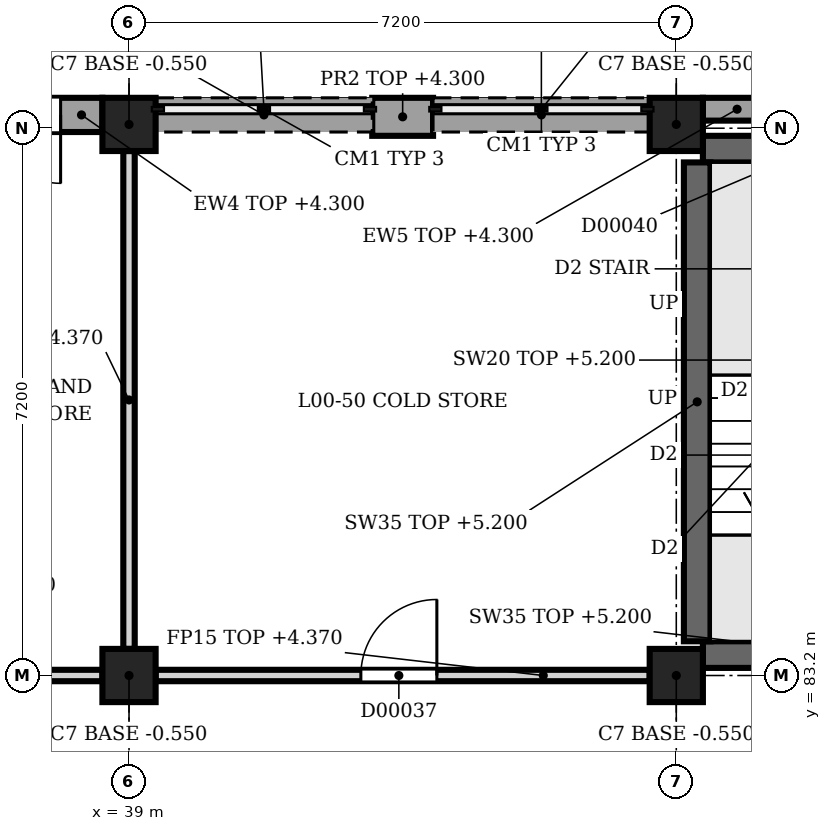
"""IFC4 building model, lengths in metres.
Left out: names, types, materials, properties, quantities, classifications, styles, units other than length and angle.
Written with IfcOpenShell. Run it as: python <this file> out.ifc"""

import sys

from ifc_helpers import new_model, si_unit, direction, frame, frame_2d, origin, origin_2d, place, context, subcontext, project, spatial, rectangle, extrude, element, fill, save


model = new_model("IFC4")
c1 = context("Model", 3, precision=1e-05, world=origin(), true_north=direction((0.0, 1.0)))
c2 = subcontext(c1, "Body", "Model", "MODEL_VIEW")
j1 = project(units=[si_unit("LENGTHUNIT", "METRE"), si_unit("PLANEANGLEUNIT", "RADIAN")], contexts=[c1])
p1 = place(None, origin())
s1 = spatial("IfcSite", under=j1, at=p1, CompositionType="ELEMENT")
p2 = place(p1, origin())
s2 = spatial("IfcBuilding", under=s1, at=p2, CompositionType="ELEMENT")
p3 = place(p2, origin())
s3 = spatial("IfcBuildingStorey", under=s2, at=p3, CompositionType="ELEMENT", Elevation=0.0)
for number, where, z_axis, x_axis in (
    (1, (39.0, 83.2, -0.55), (0.0, 0.0, 1.0), (1.0, 0.0, 0.0)),
    (2, (39.0, 90.45, -0.55), (0.0, 0.0, 1.0), (1.0, 0.0, 0.0)),
    (3, (46.2, 83.2, -0.55), (0.0, 0.0, 1.0), (1.0, 0.0, 0.0)),
    (4, (46.2, 90.45, -0.55), (0.0, 0.0, 1.0), (1.0, 0.0, 0.0)),
):
    element("IfcColumn", number, at=place(p3, frame(where, z_axis=z_axis, x_axis=x_axis)), inside=s3, PredefinedType="COLUMN", context=c2, shape_type="SweptSolid", body=[
        extrude(rectangle(XDim=0.7, YDim=0.7, at=origin_2d()), origin(), (0.0, 0.0, 1.0), 5.95),
    ])
p4 = place(p3, frame((42.2, 90.55, 0.0), z_axis=(0.0, 0.0, 1.0), x_axis=(1.0, 0.0, 0.0)))
e5 = element("IfcWall", 5, at=p4, inside=s3, PredefinedType="SOLIDWALL", context=c2, shape_type="SweptSolid", body=[
    extrude(rectangle(XDim=0.8, YDim=0.5, at=frame_2d((0.4, 0.0))), origin(), (0.0, 0.0, 1.0), 4.3),
])
p5 = place(p3, frame((35.8, 90.575, 0.0), z_axis=(0.0, 0.0, 1.0), x_axis=(1.0, 0.0, 0.0)))
e6 = element("IfcWall", 6, at=p5, inside=s3, PredefinedType="SOLIDWALL", context=c2, shape_type="SweptSolid", body=[
    extrude(rectangle(XDim=2.85, YDim=0.45, at=frame_2d((1.425, 0.0))), origin(), (0.0, 0.0, 1.0), 4.3),
])
p6 = place(p5, frame((0.5, 0.0, 0.0)))
e7 = element("IfcOpeningElement", 7, at=p6, cuts=e6, PredefinedType="OPENING", context=c2, shape_type="SweptSolid", body=[
    extrude(rectangle(XDim=1.8, YDim=2.2, at=frame_2d((0.9, 1.1))), frame((0.0, 0.235, 0.0), z_axis=(0.0, -1.0, 0.0), x_axis=(1.0, 0.0, 0.0)), (0.0, 0.0, 1.0), 0.47),
])
p7 = place(p3, frame((39.35, 90.575, 0.0), z_axis=(0.0, 0.0, 1.0), x_axis=(1.0, 0.0, 0.0)))
e8 = element("IfcWall", 8, at=p7, inside=s3, PredefinedType="SOLIDWALL", context=c2, shape_type="SweptSolid", body=[
    extrude(rectangle(XDim=2.85, YDim=0.45, at=frame_2d((1.425, 0.0))), origin(), (0.0, 0.0, 1.0), 0.6),
])
p8 = place(p3, frame((43.0, 90.575, 0.0), z_axis=(0.0, 0.0, 1.0), x_axis=(1.0, 0.0, 0.0)))
e9 = element("IfcWall", 9, at=p8, inside=s3, PredefinedType="SOLIDWALL", context=c2, shape_type="SweptSolid", body=[
    extrude(rectangle(XDim=2.85, YDim=0.45, at=frame_2d((1.425, 0.0))), origin(), (0.0, 0.0, 1.0), 0.6),
])
p9 = place(p3, frame((46.55, 90.65, 0.0), z_axis=(0.0, 0.0, 1.0), x_axis=(1.0, 0.0, 0.0)))
e10 = element("IfcWall", 10, at=p9, inside=s3, PredefinedType="SOLIDWALL", context=c2, shape_type="SweptSolid", body=[
    extrude(rectangle(XDim=2.85, YDim=0.3, at=frame_2d((1.425, 0.0))), origin(), (0.0, 0.0, 1.0), 4.3),
])
p10 = place(p9, frame((0.9, 0.0, 0.0)))
e11 = element("IfcOpeningElement", 11, at=p10, cuts=e10, PredefinedType="OPENING", context=c2, shape_type="SweptSolid", body=[
    extrude(rectangle(XDim=1.1, YDim=2.2, at=frame_2d((0.55, 1.1))), frame((0.0, 0.16, 0.0), z_axis=(0.0, -1.0, 0.0), x_axis=(1.0, 0.0, 0.0)), (0.0, 0.0, 1.0), 0.32),
])
p11 = place(p9, frame((0.9, 0.0, 2.3)))
e12 = element("IfcOpeningElement", 12, at=p11, cuts=e10, PredefinedType="OPENING", context=c2, shape_type="SweptSolid", body=[
    extrude(rectangle(XDim=1.1, YDim=0.45, at=frame_2d((0.55, 0.225))), frame((0.0, 0.16, 0.0), z_axis=(0.0, -1.0, 0.0), x_axis=(1.0, 0.0, 0.0)), (0.0, 0.0, 1.0), 0.32),
])
p12 = place(p3, frame((46.55, 83.475, 0.0), z_axis=(0.0, 0.0, 1.0), x_axis=(1.0, 0.0, 0.0)))
e13 = element("IfcWall", 13, at=p12, inside=s3, PredefinedType="SHEAR", context=c2, shape_type="SweptSolid", body=[
    extrude(rectangle(XDim=6.5, YDim=0.35, at=frame_2d((3.25, 0.0))), origin(), (0.0, 0.0, 1.0), 5.2),
])
p13 = place(p12, frame((3.85, 0.0, 0.0)))
e14 = element("IfcOpeningElement", 14, at=p13, cuts=e13, PredefinedType="OPENING", context=c2, shape_type="SweptSolid", body=[
    extrude(rectangle(XDim=1.2, YDim=2.1, at=frame_2d((0.6, 1.05))), frame((0.0, 0.185, 0.0), z_axis=(0.0, -1.0, 0.0), x_axis=(1.0, 0.0, 0.0)), (0.0, 0.0, 1.0), 0.37),
])
p14 = place(p3, frame((46.55, 90.125, 0.0), z_axis=(0.0, 0.0, 1.0), x_axis=(1.0, 0.0, 0.0)))
e15 = element("IfcWall", 15, at=p14, inside=s3, PredefinedType="SHEAR", context=c2, shape_type="SweptSolid", body=[
    extrude(rectangle(XDim=6.5, YDim=0.35, at=frame_2d((3.25, 0.0))), origin(), (0.0, 0.0, 1.0), 5.2),
])
p15 = place(p14, frame((0.9, 0.0, 0.0)))
e16 = element("IfcOpeningElement", 16, at=p15, cuts=e15, PredefinedType="OPENING", context=c2, shape_type="SweptSolid", body=[
    extrude(rectangle(XDim=1.1, YDim=2.1, at=frame_2d((0.55, 1.05))), frame((0.0, 0.185, 0.0), z_axis=(0.0, -1.0, 0.0), x_axis=(1.0, 0.0, 0.0)), (0.0, 0.0, 1.0), 0.37),
])
p16 = place(p3, frame((46.475, 83.65, 0.0), z_axis=(0.0, 0.0, 1.0), x_axis=(0.0, 1.0, 0.0)))
e17 = element("IfcWall", 17, at=p16, inside=s3, PredefinedType="SHEAR", context=c2, shape_type="SweptSolid", body=[
    extrude(rectangle(XDim=6.3, YDim=0.35, at=frame_2d((3.15, 0.0))), origin(), (0.0, 0.0, 1.0), 5.2),
])
p17 = place(p3, frame((35.4, 83.2, 0.0), z_axis=(0.0, 0.0, 1.0), x_axis=(1.0, 0.0, 0.0)))
e18 = element("IfcWall", 18, at=p17, inside=s3, PredefinedType="PARTITIONING", context=c2, shape_type="SweptSolid", body=[
    extrude(rectangle(XDim=3.25, YDim=0.15, at=frame_2d((1.625, 0.0))), origin(), (0.0, 0.0, 1.0), 4.37),
])
p18 = place(p17, frame((1.35, 0.0, 0.0)))
e19 = element("IfcOpeningElement", 19, at=p18, cuts=e18, PredefinedType="OPENING", context=c2, shape_type="SweptSolid", body=[
    extrude(rectangle(XDim=0.85, YDim=2.1, at=frame_2d((0.425, 1.05))), frame((0.0, 0.085, 0.0), z_axis=(0.0, -1.0, 0.0), x_axis=(1.0, 0.0, 0.0)), (0.0, 0.0, 1.0), 0.17),
])
p19 = place(p3, frame((39.35, 83.2, 0.0), z_axis=(0.0, 0.0, 1.0), x_axis=(1.0, 0.0, 0.0)))
e20 = element("IfcWall", 20, at=p19, inside=s3, PredefinedType="PARTITIONING", context=c2, shape_type="SweptSolid", body=[
    extrude(rectangle(XDim=6.5, YDim=0.15, at=frame_2d((3.25, 0.0))), origin(), (0.0, 0.0, 1.0), 4.37),
])
p20 = place(p19, frame((2.7, 0.0, 0.0)))
e21 = element("IfcOpeningElement", 21, at=p20, cuts=e20, PredefinedType="OPENING", context=c2, shape_type="SweptSolid", body=[
    extrude(rectangle(XDim=1.0, YDim=2.3, at=frame_2d((0.5, 1.15))), frame((0.0, 0.085, 0.0), z_axis=(0.0, -1.0, 0.0), x_axis=(1.0, 0.0, 0.0)), (0.0, 0.0, 1.0), 0.17),
])
p21 = place(p3, frame((39.0, 83.55, 0.0), z_axis=(0.0, 0.0, 1.0), x_axis=(0.0, 1.0, 0.0)))
e22 = element("IfcWall", 22, at=p21, inside=s3, PredefinedType="PARTITIONING", context=c2, shape_type="SweptSolid", body=[
    extrude(rectangle(XDim=6.55, YDim=0.15, at=frame_2d((3.275, 0.0))), origin(), (0.0, 0.0, 1.0), 4.37),
])
p22 = place(p6, origin())
e23 = element("IfcDoor", 23, at=p22, inside=s3, OperationType="SINGLE_SWING_LEFT", PredefinedType="DOOR", context=c2, shape_type="SweptSolid", body=[
    extrude(rectangle(XDim=1.8, YDim=2.2, at=frame_2d((0.9, 1.1))), frame((0.0, 0.025, 0.0), z_axis=(0.0, -1.0, 0.0), x_axis=(1.0, 0.0, 0.0)), (0.0, 0.0, 1.0), 0.05),
])
fill(e7, e23)
p23 = place(p20, origin())
e24 = element("IfcDoor", 24, at=p23, inside=s3, OperationType="SINGLE_SWING_LEFT", PredefinedType="DOOR", context=c2, shape_type="SweptSolid", body=[
    extrude(rectangle(XDim=1.0, YDim=2.3, at=frame_2d((0.5, 1.15))), frame((0.0, 0.025, 0.0), z_axis=(0.0, -1.0, 0.0), x_axis=(1.0, 0.0, 0.0)), (0.0, 0.0, 1.0), 0.05),
])
fill(e21, e24)
save(model, sys.argv[1])
